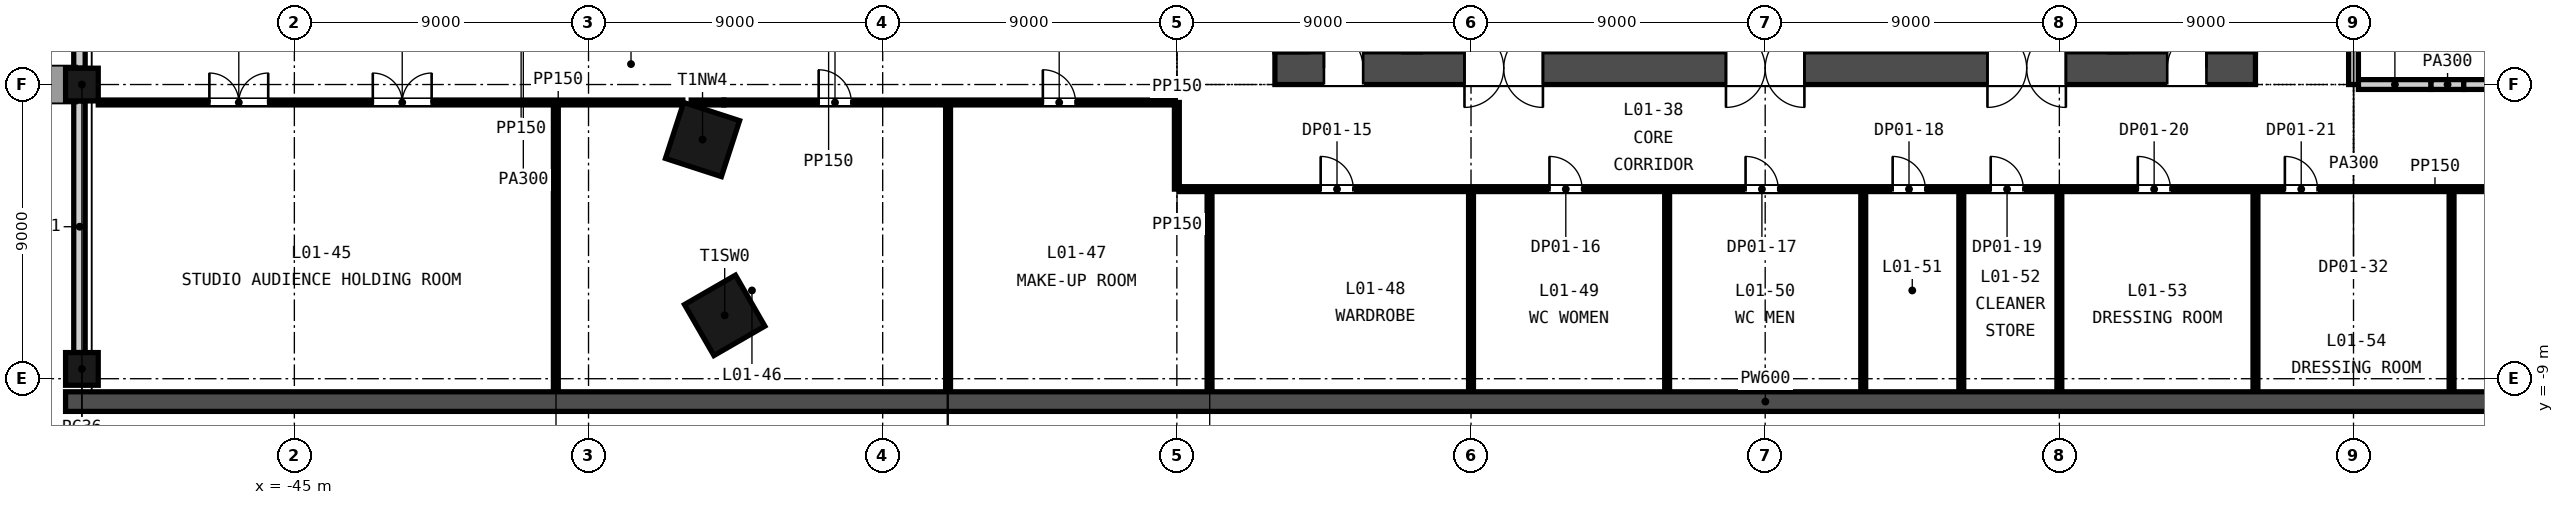
"""IFC4 building model, lengths in metres.
Left out: names, types, materials, properties, quantities, classifications, styles, units other than length and angle.
Written with IfcOpenShell. Run it as: python <this file> out.ifc"""

import sys

from ifc_helpers import new_model, si_unit, direction, frame, frame_2d, origin, origin_2d, place, context, subcontext, project, spatial, rectangle, extrude, element, fill, save


model = new_model("IFC4")
c1 = context("Model", 3, precision=1e-05, world=origin(), true_north=direction((0.0, 1.0)))
c2 = subcontext(c1, "Body", "Model", "MODEL_VIEW")
j1 = project(units=[si_unit("LENGTHUNIT", "METRE"), si_unit("PLANEANGLEUNIT", "RADIAN")], contexts=[c1])
p1 = place(None, origin())
s1 = spatial("IfcSite", under=j1, at=p1, CompositionType="ELEMENT")
p2 = place(p1, origin())
s2 = spatial("IfcBuilding", under=s1, at=p2, CompositionType="ELEMENT")
p3 = place(p2, frame((0.0, 0.0, 9.0)))
s3 = spatial("IfcBuildingStorey", under=s2, at=p3, CompositionType="ELEMENT", Elevation=9.0)
p4 = place(p3, frame((-15.0, 0.5, -0.4), z_axis=(0.0, 0.0, 1.0), x_axis=(1.0, 0.0, 0.0)))
e1 = element("IfcWall", 1, at=p4, inside=s3, PredefinedType="SOLIDWALL", context=c2, shape_type="SweptSolid", body=[
    extrude(rectangle(XDim=30.0, YDim=1.0, at=frame_2d((15.0, 0.0))), origin(), (0.0, 0.0, 1.0), 9.0),
])
p5 = place(p4, frame((5.8, 0.0, 0.4)))
e2 = element("IfcOpeningElement", 2, at=p5, cuts=e1, PredefinedType="OPENING", context=c2, shape_type="SweptSolid", body=[
    extrude(rectangle(XDim=2.4, YDim=2.4, at=frame_2d((1.2, 1.2))), frame((0.0, 0.51, 0.0), z_axis=(0.0, -1.0, 0.0), x_axis=(1.0, 0.0, 0.0)), (0.0, 0.0, 1.0), 1.02),
])
p6 = place(p4, frame((13.8, 0.0, 0.4)))
e3 = element("IfcOpeningElement", 3, at=p6, cuts=e1, PredefinedType="OPENING", context=c2, shape_type="SweptSolid", body=[
    extrude(rectangle(XDim=2.4, YDim=2.4, at=frame_2d((1.2, 1.2))), frame((0.0, 0.51, 0.0), z_axis=(0.0, -1.0, 0.0), x_axis=(1.0, 0.0, 0.0)), (0.0, 0.0, 1.0), 1.02),
])
p7 = place(p4, frame((21.8, 0.0, 0.4)))
e4 = element("IfcOpeningElement", 4, at=p7, cuts=e1, PredefinedType="OPENING", context=c2, shape_type="SweptSolid", body=[
    extrude(rectangle(XDim=2.4, YDim=2.4, at=frame_2d((1.2, 1.2))), frame((0.0, 0.51, 0.0), z_axis=(0.0, -1.0, 0.0), x_axis=(1.0, 0.0, 0.0)), (0.0, 0.0, 1.0), 1.02),
])
p8 = place(p4, frame((1.5, 0.0, 0.4)))
e5 = element("IfcOpeningElement", 5, at=p8, cuts=e1, PredefinedType="OPENING", context=c2, shape_type="SweptSolid", body=[
    extrude(rectangle(XDim=1.2, YDim=2.1, at=frame_2d((0.6, 1.05))), frame((0.0, 0.51, 0.0), z_axis=(0.0, -1.0, 0.0), x_axis=(1.0, 0.0, 0.0)), (0.0, 0.0, 1.0), 1.02),
])
p9 = place(p4, frame((27.3, 0.0, 0.4)))
e6 = element("IfcOpeningElement", 6, at=p9, cuts=e1, PredefinedType="OPENING", context=c2, shape_type="SweptSolid", body=[
    extrude(rectangle(XDim=1.2, YDim=2.1, at=frame_2d((0.6, 1.05))), frame((0.0, 0.51, 0.0), z_axis=(0.0, -1.0, 0.0), x_axis=(1.0, 0.0, 0.0)), (0.0, 0.0, 1.0), 1.02),
])
for number, where, z_axis, x_axis in (
    (7, (-32.512, -1.683, -0.4), (0.0, 0.0, 1.0), (-0.309, -0.951, 0.0)),
    (8, (-31.834, -7.061, -0.4), (0.0, 0.0, 1.0), (0.5, -0.866, 0.0)),
):
    element("IfcColumn", number, at=place(p3, frame(where, z_axis=z_axis, x_axis=x_axis)), inside=s3, PredefinedType="COLUMN", context=c2, shape_type="SweptSolid", body=[
        extrude(rectangle(XDim=1.8, YDim=1.8, at=origin_2d()), origin(), (0.0, 0.0, 1.0), 9.0),
    ])
for number, where, z_axis, x_axis in (
    (9, (-51.5, 0.0, -0.4), (0.0, 0.0, 1.0), (0.0, -1.0, 0.0)),
    (10, (-51.5, -8.7, -0.4), (0.0, 0.0, 1.0), (0.0, 1.0, 0.0)),
):
    element("IfcColumn", number, at=place(p3, frame(where, z_axis=z_axis, x_axis=x_axis)), inside=s3, PredefinedType="COLUMN", context=c2, shape_type="SweptSolid", body=[
        extrude(rectangle(XDim=1.0, YDim=1.0, at=origin_2d()), origin(), (0.0, 0.0, 1.0), 9.0),
    ])
p10 = place(p3, frame((-52.0, -9.7, -0.4), z_axis=(0.0, 0.0, 1.0), x_axis=(1.0, 0.0, 0.0)))
e11 = element("IfcWall", 11, at=p10, inside=s3, PredefinedType="SOLIDWALL", context=c2, shape_type="SweptSolid", body=[
    extrude(rectangle(XDim=104.0, YDim=0.6, at=frame_2d((52.0, 0.0))), origin(), (0.0, 0.0, 1.0), 9.0),
])
p11 = place(p3, frame((-51.575, 8.25, -0.4), z_axis=(0.0, 0.0, 1.0), x_axis=(0.0, -1.0, 0.0)))
e12 = element("IfcWall", 12, at=p11, inside=s3, PredefinedType="SOLIDWALL", context=c2, shape_type="SweptSolid", body=[
    extrude(rectangle(XDim=7.75, YDim=0.35, at=frame_2d((3.875, 0.0))), origin(), (0.0, 0.0, 1.0), 8.1),
])
p12 = place(p3, frame((-51.575, -0.5, -0.4), z_axis=(0.0, 0.0, 1.0), x_axis=(0.0, -1.0, 0.0)))
e13 = element("IfcWall", 13, at=p12, inside=s3, PredefinedType="SOLIDWALL", context=c2, shape_type="SweptSolid", body=[
    extrude(rectangle(XDim=7.7, YDim=0.35, at=frame_2d((3.85, 0.0))), origin(), (0.0, 0.0, 1.0), 8.1),
])
p13 = place(p3, frame((-17.925, -3.2, 0.0), z_axis=(0.0, 0.0, 1.0), x_axis=(1.0, 0.0, 0.0)))
e14 = element("IfcWall", 14, at=p13, inside=s3, PredefinedType="PARTITIONING", context=c2, shape_type="SweptSolid", body=[
    extrude(rectangle(XDim=41.95, YDim=0.15, at=frame_2d((20.975, 0.0))), origin(), (0.0, 0.0, 1.0), 8.6),
])
p14 = place(p13, frame((4.325, 0.0, 0.0)))
e15 = element("IfcOpeningElement", 15, at=p14, cuts=e14, PredefinedType="OPENING", context=c2, shape_type="SweptSolid", body=[
    extrude(rectangle(XDim=1.0, YDim=2.1, at=frame_2d((0.5, 1.05))), frame((0.0, 0.085, 0.0), z_axis=(0.0, -1.0, 0.0), x_axis=(1.0, 0.0, 0.0)), (0.0, 0.0, 1.0), 0.17),
])
p15 = place(p13, frame((11.325, 0.0, 0.0)))
e16 = element("IfcOpeningElement", 16, at=p15, cuts=e14, PredefinedType="OPENING", context=c2, shape_type="SweptSolid", body=[
    extrude(rectangle(XDim=1.0, YDim=2.1, at=frame_2d((0.5, 1.05))), frame((0.0, 0.085, 0.0), z_axis=(0.0, -1.0, 0.0), x_axis=(1.0, 0.0, 0.0)), (0.0, 0.0, 1.0), 0.17),
])
p16 = place(p13, frame((17.325, 0.0, 0.0)))
e17 = element("IfcOpeningElement", 17, at=p16, cuts=e14, PredefinedType="OPENING", context=c2, shape_type="SweptSolid", body=[
    extrude(rectangle(XDim=1.0, YDim=2.1, at=frame_2d((0.5, 1.05))), frame((0.0, 0.085, 0.0), z_axis=(0.0, -1.0, 0.0), x_axis=(1.0, 0.0, 0.0)), (0.0, 0.0, 1.0), 0.17),
])
p17 = place(p13, frame((21.825, 0.0, 0.0)))
e18 = element("IfcOpeningElement", 18, at=p17, cuts=e14, PredefinedType="OPENING", context=c2, shape_type="SweptSolid", body=[
    extrude(rectangle(XDim=1.0, YDim=2.1, at=frame_2d((0.5, 1.05))), frame((0.0, 0.085, 0.0), z_axis=(0.0, -1.0, 0.0), x_axis=(1.0, 0.0, 0.0)), (0.0, 0.0, 1.0), 0.17),
])
p18 = place(p13, frame((24.825, 0.0, 0.0)))
e19 = element("IfcOpeningElement", 19, at=p18, cuts=e14, PredefinedType="OPENING", context=c2, shape_type="SweptSolid", body=[
    extrude(rectangle(XDim=1.0, YDim=2.1, at=frame_2d((0.5, 1.05))), frame((0.0, 0.085, 0.0), z_axis=(0.0, -1.0, 0.0), x_axis=(1.0, 0.0, 0.0)), (0.0, 0.0, 1.0), 0.17),
])
p19 = place(p13, frame((29.325, 0.0, 0.0)))
e20 = element("IfcOpeningElement", 20, at=p19, cuts=e14, PredefinedType="OPENING", context=c2, shape_type="SweptSolid", body=[
    extrude(rectangle(XDim=1.0, YDim=2.1, at=frame_2d((0.5, 1.05))), frame((0.0, 0.085, 0.0), z_axis=(0.0, -1.0, 0.0), x_axis=(1.0, 0.0, 0.0)), (0.0, 0.0, 1.0), 0.17),
])
p20 = place(p13, frame((33.825, 0.0, 0.0)))
e21 = element("IfcOpeningElement", 21, at=p20, cuts=e14, PredefinedType="OPENING", context=c2, shape_type="SweptSolid", body=[
    extrude(rectangle(XDim=1.0, YDim=2.1, at=frame_2d((0.5, 1.05))), frame((0.0, 0.085, 0.0), z_axis=(0.0, -1.0, 0.0), x_axis=(1.0, 0.0, 0.0)), (0.0, 0.0, 1.0), 0.17),
])
p21 = place(p3, frame((-51.0, -0.549, 0.0), z_axis=(0.0, 0.0, 1.0), x_axis=(1.0, 0.0, 0.0)))
e22 = element("IfcWall", 22, at=p21, inside=s3, PredefinedType="PARTITIONING", context=c2, shape_type="SweptSolid", body=[
    extrude(rectangle(XDim=17.886, YDim=0.15, at=frame_2d((8.943, 0.0))), origin(), (0.0, 0.0, 1.0), 8.6),
])
p22 = place(p21, frame((3.4, 0.0, 0.0)))
e23 = element("IfcOpeningElement", 23, at=p22, cuts=e22, PredefinedType="OPENING", context=c2, shape_type="SweptSolid", body=[
    extrude(rectangle(XDim=1.8, YDim=2.4, at=frame_2d((0.9, 1.2))), frame((0.0, 0.085, 0.0), z_axis=(0.0, -1.0, 0.0), x_axis=(1.0, 0.0, 0.0)), (0.0, 0.0, 1.0), 0.17),
])
p23 = place(p21, frame((8.4, 0.0, 0.0)))
e24 = element("IfcOpeningElement", 24, at=p23, cuts=e22, PredefinedType="OPENING", context=c2, shape_type="SweptSolid", body=[
    extrude(rectangle(XDim=1.8, YDim=2.4, at=frame_2d((0.9, 1.2))), frame((0.0, 0.085, 0.0), z_axis=(0.0, -1.0, 0.0), x_axis=(1.0, 0.0, 0.0)), (0.0, 0.0, 1.0), 0.17),
])
p24 = place(p3, frame((-32.859, -0.549, 0.0), z_axis=(0.0, 0.0, 1.0), x_axis=(1.0, 0.0, 0.0)))
e25 = element("IfcWall", 25, at=p24, inside=s3, PredefinedType="PARTITIONING", context=c2, shape_type="SweptSolid", body=[
    extrude(rectangle(XDim=1.0, YDim=0.15, at=frame_2d((0.5, 0.0))), origin(), (0.0, 0.0, 1.0), 7.6),
])
p25 = place(p3, frame((-31.859, -0.549, 0.0), z_axis=(0.0, 0.0, 1.0), x_axis=(1.0, 0.0, 0.0)))
e26 = element("IfcWall", 26, at=p25, inside=s3, PredefinedType="PARTITIONING", context=c2, shape_type="SweptSolid", body=[
    extrude(rectangle(XDim=13.784, YDim=0.15, at=frame_2d((6.892, 0.0))), origin(), (0.0, 0.0, 1.0), 8.6),
])
p26 = place(p25, frame((2.9, 0.0, 0.0)))
e27 = element("IfcOpeningElement", 27, at=p26, cuts=e26, PredefinedType="OPENING", context=c2, shape_type="SweptSolid", body=[
    extrude(rectangle(XDim=1.0, YDim=2.1, at=frame_2d((0.5, 1.05))), frame((0.0, 0.085, 0.0), z_axis=(0.0, -1.0, 0.0), x_axis=(1.0, 0.0, 0.0)), (0.0, 0.0, 1.0), 0.17),
])
p27 = place(p25, frame((9.759, 0.0, 0.0)))
e28 = element("IfcOpeningElement", 28, at=p27, cuts=e26, PredefinedType="OPENING", context=c2, shape_type="SweptSolid", body=[
    extrude(rectangle(XDim=1.0, YDim=2.1, at=frame_2d((0.5, 1.05))), frame((0.0, 0.085, 0.0), z_axis=(0.0, -1.0, 0.0), x_axis=(1.0, 0.0, 0.0)), (0.0, 0.0, 1.0), 0.17),
])
p28 = place(p3, frame((18.15, 0.0, 0.0), z_axis=(0.0, 0.0, 1.0), x_axis=(1.0, 0.0, 0.0)))
e29 = element("IfcWall", 29, at=p28, inside=s3, PredefinedType="PARTITIONING", context=c2, shape_type="SweptSolid", body=[
    extrude(rectangle(XDim=2.222, YDim=0.3, at=frame_2d((1.111, 0.0))), origin(), (0.0, 0.0, 1.0), 8.6),
])
p29 = place(p3, frame((20.372, 0.0, 0.0), z_axis=(0.0, 0.0, 1.0), x_axis=(1.0, 0.0, 0.0)))
e30 = element("IfcWall", 30, at=p29, inside=s3, PredefinedType="PARTITIONING", context=c2, shape_type="SweptSolid", body=[
    extrude(rectangle(XDim=1.0, YDim=0.3, at=frame_2d((0.5, 0.0))), origin(), (0.0, 0.0, 1.0), 7.765),
])
p30 = place(p3, frame((21.372, 0.0, 0.0), z_axis=(0.0, 0.0, 1.0), x_axis=(1.0, 0.0, 0.0)))
e31 = element("IfcWall", 31, at=p30, inside=s3, PredefinedType="PARTITIONING", context=c2, shape_type="SweptSolid", body=[
    extrude(rectangle(XDim=2.128, YDim=0.3, at=frame_2d((1.064, 0.0))), origin(), (0.0, 0.0, 1.0), 8.6),
])
for number, where, z_axis, x_axis in (
    (32, (-37.0, -9.4, 0.0), (0.0, 0.0, 1.0), (0.0, 1.0, 0.0)),
    (33, (-25.0, -9.4, 0.0), (0.0, 0.0, 1.0), (0.0, 1.0, 0.0)),
):
    element("IfcWall", number, at=place(p3, frame(where, z_axis=z_axis, x_axis=x_axis)), inside=s3, PredefinedType="PARTITIONING", context=c2, shape_type="SweptSolid", body=[
        extrude(rectangle(XDim=8.776, YDim=0.15, at=frame_2d((4.388, 0.0))), origin(), (0.0, 0.0, 1.0), 8.6),
    ])
p31 = place(p3, frame((-18.0, -3.2, 0.0), z_axis=(0.0, 0.0, 1.0), x_axis=(0.0, 1.0, 0.0)))
e34 = element("IfcWall", 34, at=p31, inside=s3, PredefinedType="PARTITIONING", context=c2, shape_type="SweptSolid", body=[
    extrude(rectangle(XDim=2.651, YDim=0.15, at=frame_2d((1.326, 0.0))), origin(), (0.0, 0.0, 1.0), 8.6),
])
p32 = place(p3, frame((-17.0, -9.4, 0.0), z_axis=(0.0, 0.0, 1.0), x_axis=(0.0, 1.0, 0.0)))
e35 = element("IfcWall", 35, at=p32, inside=s3, PredefinedType="PARTITIONING", context=c2, shape_type="SweptSolid", body=[
    extrude(rectangle(XDim=6.125, YDim=0.15, at=frame_2d((3.062, 0.0))), origin(), (0.0, 0.0, 1.0), 8.6),
])
for number, where, z_axis, x_axis in (
    (36, (-9.0, -9.4, 0.0), (0.0, 0.0, 1.0), (0.0, 1.0, 0.0)),
    (37, (-3.0, -9.4, 0.0), (0.0, 0.0, 1.0), (0.0, 1.0, 0.0)),
    (38, (3.0, -9.4, 0.0), (0.0, 0.0, 1.0), (0.0, 1.0, 0.0)),
):
    element("IfcWall", number, at=place(p3, frame(where, z_axis=z_axis, x_axis=x_axis)), inside=s3, PredefinedType="PARTITIONING", context=c2, shape_type="SweptSolid", body=[
        extrude(rectangle(XDim=6.125, YDim=0.15, at=frame_2d((3.062, 0.0))), origin(), (0.0, 0.0, 1.0), 7.997),
    ])
p33 = place(p3, frame((6.0, -9.4, 0.0), z_axis=(0.0, 0.0, 1.0), x_axis=(0.0, 1.0, 0.0)))
e39 = element("IfcWall", 39, at=p33, inside=s3, PredefinedType="PARTITIONING", context=c2, shape_type="SweptSolid", body=[
    extrude(rectangle(XDim=6.125, YDim=0.15, at=frame_2d((3.062, 0.0))), origin(), (0.0, 0.0, 1.0), 8.6),
])
for number, where, z_axis, x_axis in (
    (40, (9.0, -9.4, 0.0), (0.0, 0.0, 1.0), (0.0, 1.0, 0.0)),
    (41, (15.0, -9.4, 0.0), (0.0, 0.0, 1.0), (0.0, 1.0, 0.0)),
):
    element("IfcWall", number, at=place(p3, frame(where, z_axis=z_axis, x_axis=x_axis)), inside=s3, PredefinedType="PARTITIONING", context=c2, shape_type="SweptSolid", body=[
        extrude(rectangle(XDim=6.125, YDim=0.15, at=frame_2d((3.062, 0.0))), origin(), (0.0, 0.0, 1.0), 7.997),
    ])
p34 = place(p3, frame((18.0, 0.0, 0.0), z_axis=(0.0, 0.0, 1.0), x_axis=(0.0, 1.0, 0.0)))
e42 = element("IfcWall", 42, at=p34, inside=s3, PredefinedType="PARTITIONING", context=c2, shape_type="SweptSolid", body=[
    extrude(rectangle(XDim=7.0, YDim=0.3, at=frame_2d((3.5, 0.0))), origin(), (0.0, 0.0, 1.0), 8.6),
])
p35 = place(p34, frame((2.4, 0.0, 0.0)))
e43 = element("IfcOpeningElement", 43, at=p35, cuts=e42, PredefinedType="OPENING", context=c2, shape_type="SweptSolid", body=[
    extrude(rectangle(XDim=2.4, YDim=2.4, at=frame_2d((1.2, 1.2))), frame((0.0, 0.16, 0.0), z_axis=(0.0, -1.0, 0.0), x_axis=(1.0, 0.0, 0.0)), (0.0, 0.0, 1.0), 0.32),
])
p36 = place(p3, frame((21.0, -9.4, 0.0), z_axis=(0.0, 0.0, 1.0), x_axis=(0.0, 1.0, 0.0)))
e44 = element("IfcWall", 44, at=p36, inside=s3, PredefinedType="PARTITIONING", context=c2, shape_type="SweptSolid", body=[
    extrude(rectangle(XDim=6.125, YDim=0.15, at=frame_2d((3.062, 0.0))), origin(), (0.0, 0.0, 1.0), 7.765),
])
p37 = place(p5, origin())
e45 = element("IfcDoor", 45, at=p37, inside=s3, OperationType="DOUBLE_DOOR_DOUBLE_SWING", PredefinedType="DOOR", context=c2, shape_type="SweptSolid", body=[
    extrude(rectangle(XDim=2.4, YDim=2.4, at=frame_2d((1.2, 1.2))), frame((0.0, 0.025, 0.0), z_axis=(0.0, -1.0, 0.0), x_axis=(1.0, 0.0, 0.0)), (0.0, 0.0, 1.0), 0.05),
])
fill(e2, e45)
p38 = place(p6, origin())
e46 = element("IfcDoor", 46, at=p38, inside=s3, OperationType="DOUBLE_DOOR_DOUBLE_SWING", PredefinedType="DOOR", context=c2, shape_type="SweptSolid", body=[
    extrude(rectangle(XDim=2.4, YDim=2.4, at=frame_2d((1.2, 1.2))), frame((0.0, 0.025, 0.0), z_axis=(0.0, -1.0, 0.0), x_axis=(1.0, 0.0, 0.0)), (0.0, 0.0, 1.0), 0.05),
])
fill(e3, e46)
p39 = place(p7, origin())
e47 = element("IfcDoor", 47, at=p39, inside=s3, OperationType="DOUBLE_DOOR_DOUBLE_SWING", PredefinedType="DOOR", context=c2, shape_type="SweptSolid", body=[
    extrude(rectangle(XDim=2.4, YDim=2.4, at=frame_2d((1.2, 1.2))), frame((0.0, 0.025, 0.0), z_axis=(0.0, -1.0, 0.0), x_axis=(1.0, 0.0, 0.0)), (0.0, 0.0, 1.0), 0.05),
])
fill(e4, e47)
p40 = place(p8, origin())
e48 = element("IfcDoor", 48, at=p40, inside=s3, OperationType="SINGLE_SWING_LEFT", PredefinedType="DOOR", context=c2, shape_type="SweptSolid", body=[
    extrude(rectangle(XDim=1.2, YDim=2.1, at=frame_2d((0.6, 1.05))), frame((0.0, 0.025, 0.0), z_axis=(0.0, -1.0, 0.0), x_axis=(1.0, 0.0, 0.0)), (0.0, 0.0, 1.0), 0.05),
])
fill(e5, e48)
p41 = place(p9, origin())
e49 = element("IfcDoor", 49, at=p41, inside=s3, OperationType="SINGLE_SWING_RIGHT", PredefinedType="DOOR", context=c2, shape_type="SweptSolid", body=[
    extrude(rectangle(XDim=1.2, YDim=2.1, at=frame_2d((0.6, 1.05))), frame((0.0, 0.025, 0.0), z_axis=(0.0, -1.0, 0.0), x_axis=(1.0, 0.0, 0.0)), (0.0, 0.0, 1.0), 0.05),
])
fill(e6, e49)
p42 = place(p22, origin())
e50 = element("IfcDoor", 50, at=p42, inside=s3, OperationType="SINGLE_SWING_LEFT", PredefinedType="DOOR", context=c2, shape_type="SweptSolid", body=[
    extrude(rectangle(XDim=1.8, YDim=2.4, at=frame_2d((0.9, 1.2))), frame((0.0, 0.025, 0.0), z_axis=(0.0, -1.0, 0.0), x_axis=(1.0, 0.0, 0.0)), (0.0, 0.0, 1.0), 0.05),
])
fill(e23, e50)
p43 = place(p23, origin())
e51 = element("IfcDoor", 51, at=p43, inside=s3, OperationType="SINGLE_SWING_LEFT", PredefinedType="DOOR", context=c2, shape_type="SweptSolid", body=[
    extrude(rectangle(XDim=1.8, YDim=2.4, at=frame_2d((0.9, 1.2))), frame((0.0, 0.025, 0.0), z_axis=(0.0, -1.0, 0.0), x_axis=(1.0, 0.0, 0.0)), (0.0, 0.0, 1.0), 0.05),
])
fill(e24, e51)
p44 = place(p26, origin())
e52 = element("IfcDoor", 52, at=p44, inside=s3, OperationType="SINGLE_SWING_LEFT", PredefinedType="DOOR", context=c2, shape_type="SweptSolid", body=[
    extrude(rectangle(XDim=1.0, YDim=2.1, at=frame_2d((0.5, 1.05))), frame((0.0, 0.025, 0.0), z_axis=(0.0, -1.0, 0.0), x_axis=(1.0, 0.0, 0.0)), (0.0, 0.0, 1.0), 0.05),
])
fill(e27, e52)
p45 = place(p27, origin())
e53 = element("IfcDoor", 53, at=p45, inside=s3, OperationType="SINGLE_SWING_LEFT", PredefinedType="DOOR", context=c2, shape_type="SweptSolid", body=[
    extrude(rectangle(XDim=1.0, YDim=2.1, at=frame_2d((0.5, 1.05))), frame((0.0, 0.025, 0.0), z_axis=(0.0, -1.0, 0.0), x_axis=(1.0, 0.0, 0.0)), (0.0, 0.0, 1.0), 0.05),
])
fill(e28, e53)
p46 = place(p14, origin())
e54 = element("IfcDoor", 54, at=p46, inside=s3, OperationType="SINGLE_SWING_LEFT", PredefinedType="DOOR", context=c2, shape_type="SweptSolid", body=[
    extrude(rectangle(XDim=1.0, YDim=2.1, at=frame_2d((0.5, 1.05))), frame((0.0, 0.025, 0.0), z_axis=(0.0, -1.0, 0.0), x_axis=(1.0, 0.0, 0.0)), (0.0, 0.0, 1.0), 0.05),
])
fill(e15, e54)
p47 = place(p15, origin())
e55 = element("IfcDoor", 55, at=p47, inside=s3, OperationType="SINGLE_SWING_LEFT", PredefinedType="DOOR", context=c2, shape_type="SweptSolid", body=[
    extrude(rectangle(XDim=1.0, YDim=2.1, at=frame_2d((0.5, 1.05))), frame((0.0, 0.025, 0.0), z_axis=(0.0, -1.0, 0.0), x_axis=(1.0, 0.0, 0.0)), (0.0, 0.0, 1.0), 0.05),
])
fill(e16, e55)
p48 = place(p16, origin())
e56 = element("IfcDoor", 56, at=p48, inside=s3, OperationType="SINGLE_SWING_LEFT", PredefinedType="DOOR", context=c2, shape_type="SweptSolid", body=[
    extrude(rectangle(XDim=1.0, YDim=2.1, at=frame_2d((0.5, 1.05))), frame((0.0, 0.025, 0.0), z_axis=(0.0, -1.0, 0.0), x_axis=(1.0, 0.0, 0.0)), (0.0, 0.0, 1.0), 0.05),
])
fill(e17, e56)
p49 = place(p17, origin())
e57 = element("IfcDoor", 57, at=p49, inside=s3, OperationType="SINGLE_SWING_LEFT", PredefinedType="DOOR", context=c2, shape_type="SweptSolid", body=[
    extrude(rectangle(XDim=1.0, YDim=2.1, at=frame_2d((0.5, 1.05))), frame((0.0, 0.025, 0.0), z_axis=(0.0, -1.0, 0.0), x_axis=(1.0, 0.0, 0.0)), (0.0, 0.0, 1.0), 0.05),
])
fill(e18, e57)
p50 = place(p18, origin())
e58 = element("IfcDoor", 58, at=p50, inside=s3, OperationType="SINGLE_SWING_LEFT", PredefinedType="DOOR", context=c2, shape_type="SweptSolid", body=[
    extrude(rectangle(XDim=1.0, YDim=2.1, at=frame_2d((0.5, 1.05))), frame((0.0, 0.025, 0.0), z_axis=(0.0, -1.0, 0.0), x_axis=(1.0, 0.0, 0.0)), (0.0, 0.0, 1.0), 0.05),
])
fill(e19, e58)
p51 = place(p19, origin())
e59 = element("IfcDoor", 59, at=p51, inside=s3, OperationType="SINGLE_SWING_LEFT", PredefinedType="DOOR", context=c2, shape_type="SweptSolid", body=[
    extrude(rectangle(XDim=1.0, YDim=2.1, at=frame_2d((0.5, 1.05))), frame((0.0, 0.025, 0.0), z_axis=(0.0, -1.0, 0.0), x_axis=(1.0, 0.0, 0.0)), (0.0, 0.0, 1.0), 0.05),
])
fill(e20, e59)
p52 = place(p20, origin())
e60 = element("IfcDoor", 60, at=p52, inside=s3, OperationType="SINGLE_SWING_LEFT", PredefinedType="DOOR", context=c2, shape_type="SweptSolid", body=[
    extrude(rectangle(XDim=1.0, YDim=2.1, at=frame_2d((0.5, 1.05))), frame((0.0, 0.025, 0.0), z_axis=(0.0, -1.0, 0.0), x_axis=(1.0, 0.0, 0.0)), (0.0, 0.0, 1.0), 0.05),
])
fill(e21, e60)
save(model, sys.argv[1])
